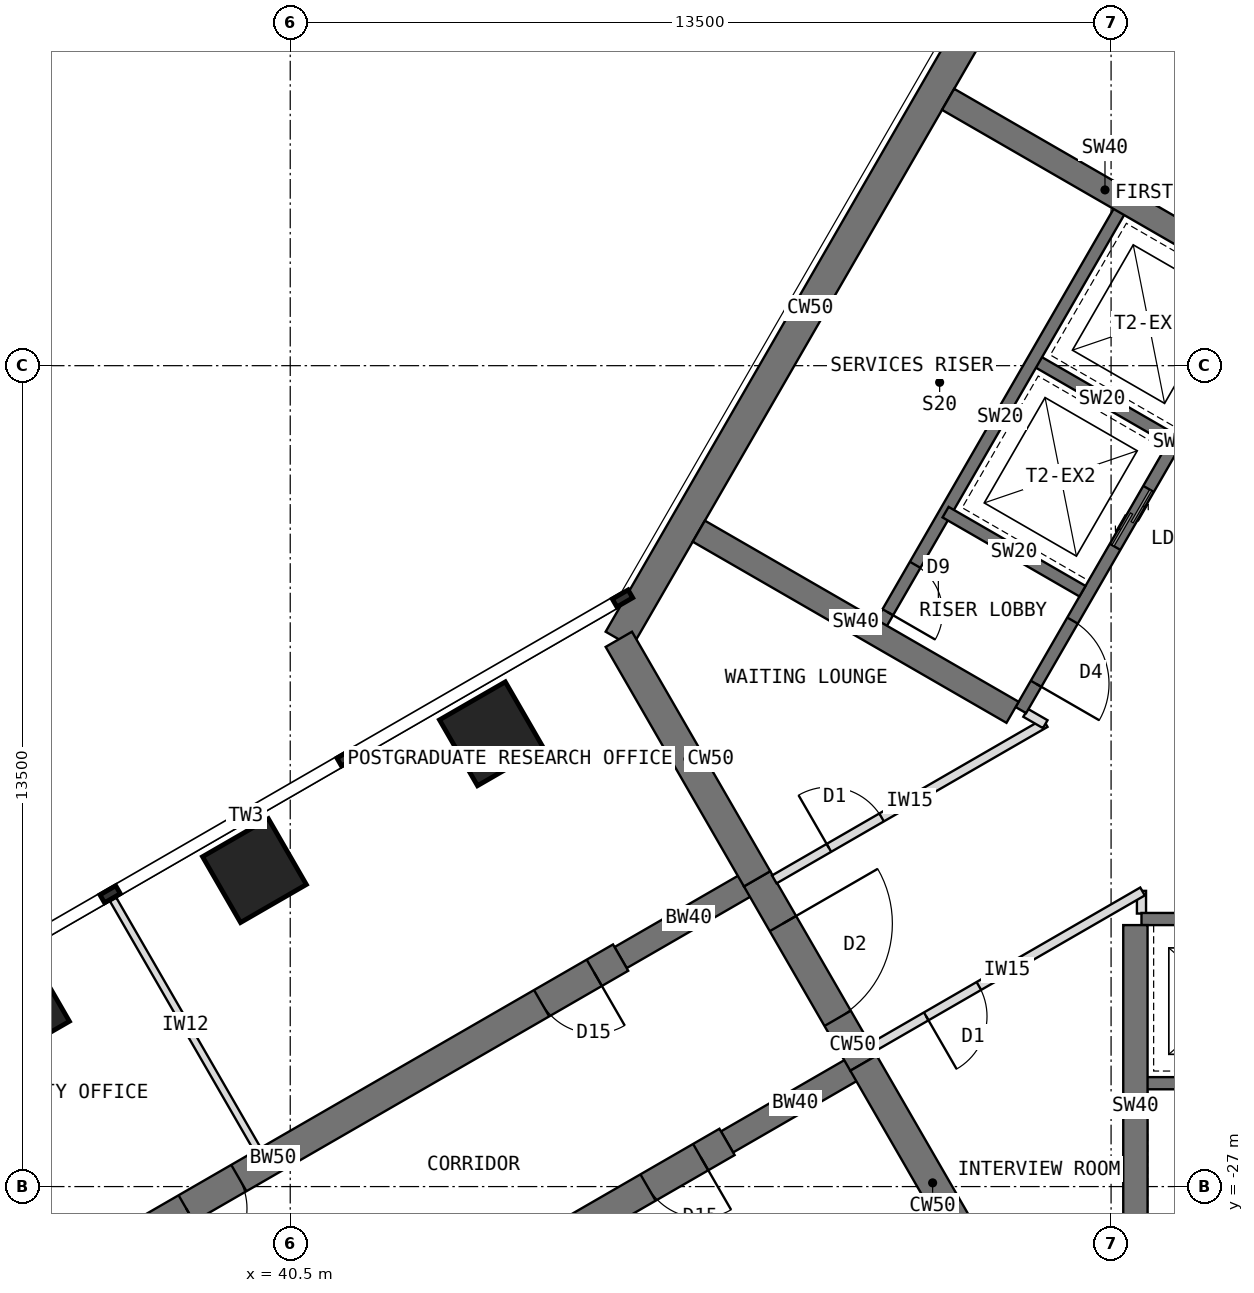
"""IFC4 building model, lengths in metres.
Left out: names, types, materials, properties, quantities, classifications, styles, units other than length and angle.
Written with IfcOpenShell. Run it as: python <this file> out.ifc"""

import sys

from ifc_helpers import new_model, si_unit, direction, frame, frame_2d, origin, origin_2d, place, context, subcontext, project, spatial, rectangle, extrude, element, fill, save


model = new_model("IFC4")
c1 = context("Model", 3, precision=1e-05, world=origin(), true_north=direction((0.0, 1.0)))
c2 = subcontext(c1, "Body", "Model", "MODEL_VIEW")
j1 = project(units=[si_unit("LENGTHUNIT", "METRE"), si_unit("PLANEANGLEUNIT", "RADIAN")], contexts=[c1])
p1 = place(None, origin())
s1 = spatial("IfcSite", under=j1, at=p1, CompositionType="ELEMENT")
p2 = place(p1, origin())
s2 = spatial("IfcBuilding", under=s1, at=p2, CompositionType="ELEMENT")
p3 = place(p2, frame((0.0, 0.0, 170.5)))
s3 = spatial("IfcBuildingStorey", under=s2, at=p3, CompositionType="ELEMENT", Elevation=170.5)
p4 = place(p3, frame((52.202, -7.092, 0.0), z_axis=(0.0, 0.0, 1.0), x_axis=(-0.500005998175, -0.866021940709, 0.0)))
e1 = element("IfcWall", 1, at=p4, inside=s3, PredefinedType="SHEAR", context=c2, shape_type="SweptSolid", body=[
    extrude(rectangle(XDim=12.596, YDim=0.5, at=frame_2d((6.298, 0.0))), origin(), (0.0, 0.0, 1.0), 4.0),
])
p5 = place(p3, frame((45.904, -18.0, 0.0), z_axis=(0.0, 0.0, 1.0), x_axis=(0.500024481964, -0.866011268655, 0.0)))
e2 = element("IfcWall", 2, at=p5, inside=s3, PredefinedType="SHEAR", context=c2, shape_type="SweptSolid", body=[
    extrude(rectangle(XDim=4.548, YDim=0.5, at=frame_2d((2.274, 0.0))), origin(), (0.0, 0.0, 1.0), 4.0),
])
p6 = place(p3, frame((48.178, -21.939, 0.0), z_axis=(0.0, 0.0, 1.0), x_axis=(0.500010275428, -0.866019471182, 0.0)))
e3 = element("IfcWall", 3, at=p6, inside=s3, PredefinedType="SHEAR", context=c2, shape_type="SweptSolid", body=[
    extrude(rectangle(XDim=3.5, YDim=0.5, at=frame_2d((1.75, 0.0))), origin(), (0.0, 0.0, 1.0), 4.0),
])
p7 = place(p6, frame((0.85, 0.0, 0.0)))
e4 = element("IfcOpeningElement", 4, at=p7, cuts=e3, PredefinedType="OPENING", context=c2, shape_type="SweptSolid", body=[
    extrude(rectangle(XDim=1.8, YDim=2.1, at=frame_2d((0.9, 1.05))), frame((0.0, 0.26, 0.0), z_axis=(0.0, -1.0, 0.0), x_axis=(1.0, 0.0, 0.0)), (0.0, 0.0, 1.0), 0.52),
])
p8 = place(p3, frame((49.928, -24.97, 0.0), z_axis=(0.0, 0.0, 1.0), x_axis=(0.499984222037, -0.866034513004, 0.0)))
e5 = element("IfcWall", 5, at=p8, inside=s3, PredefinedType="SHEAR", context=c2, shape_type="SweptSolid", body=[
    extrude(rectangle(XDim=4.548, YDim=0.5, at=frame_2d((2.274, 0.0))), origin(), (0.0, 0.0, 1.0), 4.0),
])
p9 = place(p3, frame((49.928, -24.97, 0.0), z_axis=(0.0, 0.0, 1.0), x_axis=(-0.866031863473, -0.499988811324, 0.0)))
e6 = element("IfcWall", 6, at=p9, inside=s3, PredefinedType="SHEAR", context=c2, shape_type="SweptSolid", body=[
    extrude(rectangle(XDim=2.592, YDim=0.4, at=frame_2d((1.296, 0.0))), origin(), (0.0, 0.0, 1.0), 4.0),
])
p10 = place(p3, frame((47.684, -26.266, 0.0), z_axis=(0.0, 0.0, 1.0), x_axis=(-0.866027579429, -0.499996231654, 0.0)))
e7 = element("IfcWall", 7, at=p10, inside=s3, PredefinedType="SHEAR", context=c2, shape_type="SweptSolid", body=[
    extrude(rectangle(XDim=13.2, YDim=0.5, at=frame_2d((6.6, 0.0))), origin(), (0.0, 0.0, 1.0), 4.0),
])
p11 = place(p10, frame((0.5, 0.0, 0.0)))
e8 = element("IfcOpeningElement", 8, at=p11, cuts=e7, PredefinedType="OPENING", context=c2, shape_type="SweptSolid", body=[
    extrude(rectangle(XDim=1.0, YDim=2.1, at=frame_2d((0.5, 1.05))), frame((0.0, 0.26, 0.0), z_axis=(0.0, -1.0, 0.0), x_axis=(1.0, 0.0, 0.0)), (0.0, 0.0, 1.0), 0.52),
])
p12 = place(p10, frame((7.25, 0.0, 0.0)))
e9 = element("IfcOpeningElement", 9, at=p12, cuts=e7, PredefinedType="OPENING", context=c2, shape_type="SweptSolid", body=[
    extrude(rectangle(XDim=1.0, YDim=2.1, at=frame_2d((0.5, 1.05))), frame((0.0, 0.26, 0.0), z_axis=(0.0, -1.0, 0.0), x_axis=(1.0, 0.0, 0.0)), (0.0, 0.0, 1.0), 0.52),
])
p13 = place(p3, frame((48.178, -21.939, 0.0), z_axis=(0.0, 0.0, 1.0), x_axis=(-0.866072649678, -0.499918158782, 0.0)))
e10 = element("IfcWall", 10, at=p13, inside=s3, PredefinedType="SHEAR", context=c2, shape_type="SweptSolid", body=[
    extrude(rectangle(XDim=2.592, YDim=0.4, at=frame_2d((1.296, 0.0))), origin(), (0.0, 0.0, 1.0), 4.0),
])
p14 = place(p3, frame((45.934, -23.234, 0.0), z_axis=(0.0, 0.0, 1.0), x_axis=(-0.866019570528, -0.500010103361, 0.0)))
e11 = element("IfcWall", 11, at=p14, inside=s3, PredefinedType="SHEAR", context=c2, shape_type="SweptSolid", body=[
    extrude(rectangle(XDim=13.2, YDim=0.5, at=frame_2d((6.6, 0.0))), origin(), (0.0, 0.0, 1.0), 4.0),
])
p15 = place(p14, frame((0.5, 0.0, 0.0)))
e12 = element("IfcOpeningElement", 12, at=p15, cuts=e11, PredefinedType="OPENING", context=c2, shape_type="SweptSolid", body=[
    extrude(rectangle(XDim=1.0, YDim=2.1, at=frame_2d((0.5, 1.05))), frame((0.0, 0.26, 0.0), z_axis=(0.0, -1.0, 0.0), x_axis=(1.0, 0.0, 0.0)), (0.0, 0.0, 1.0), 0.52),
])
p16 = place(p14, frame((7.25, 0.0, 0.0)))
e13 = element("IfcOpeningElement", 13, at=p16, cuts=e11, PredefinedType="OPENING", context=c2, shape_type="SweptSolid", body=[
    extrude(rectangle(XDim=1.0, YDim=2.1, at=frame_2d((0.5, 1.05))), frame((0.0, 0.26, 0.0), z_axis=(0.0, -1.0, 0.0), x_axis=(1.0, 0.0, 0.0)), (0.0, 0.0, 1.0), 0.52),
])
for number, where, z_axis, x_axis in (
    (14, (43.809, -19.554, 0.0), (0.0, 0.0, 1.0), (0.866, 0.5, 0.0)),
    (15, (39.912, -21.804, 0.0), (0.0, 0.0, 1.0), (0.866, 0.5, 0.0)),
    (16, (36.014, -24.054, 0.0), (0.0, 0.0, 1.0), (0.866, 0.5, 0.0)),
):
    element("IfcColumn", number, at=place(p3, frame(where, z_axis=z_axis, x_axis=x_axis)), inside=s3, PredefinedType="COLUMN", context=c2, shape_type="SweptSolid", body=[
        extrude(rectangle(XDim=1.25, YDim=1.25, at=origin_2d()), origin(), (0.0, 0.0, 1.0), 4.0),
    ])
p17 = place(p3, frame((56.516, -12.236, 0.0), z_axis=(0.0, 0.0, 1.0), x_axis=(-0.49999894854, -0.866026010844, 0.0)))
e17 = element("IfcWall", 17, at=p17, inside=s3, PredefinedType="SHEAR", context=c2, shape_type="SweptSolid", body=[
    extrude(rectangle(XDim=8.0, YDim=0.2, at=frame_2d((4.0, 0.0))), origin(), (0.0, 0.0, 1.0), 4.0),
])
p18 = place(p17, frame((6.3, 0.0, 0.0)))
e18 = element("IfcOpeningElement", 18, at=p18, cuts=e17, PredefinedType="OPENING", context=c2, shape_type="SweptSolid", body=[
    extrude(rectangle(XDim=1.2, YDim=2.1, at=frame_2d((0.6, 1.05))), frame((0.0, 0.11, 0.0), z_axis=(0.0, -1.0, 0.0), x_axis=(1.0, 0.0, 0.0)), (0.0, 0.0, 1.0), 0.22),
])
p19 = place(p17, frame((0.9, 0.0, 0.0)))
e19 = element("IfcOpeningElement", 19, at=p19, cuts=e17, PredefinedType="OPENING", context=c2, shape_type="SweptSolid", body=[
    extrude(rectangle(XDim=1.1, YDim=2.2, at=frame_2d((0.55, 1.1))), frame((0.0, 0.11, 0.0), z_axis=(0.0, -1.0, 0.0), x_axis=(1.0, 0.0, 0.0)), (0.0, 0.0, 1.0), 0.22),
])
p20 = place(p17, frame((3.8, 0.0, 0.0)))
e20 = element("IfcOpeningElement", 20, at=p20, cuts=e17, PredefinedType="OPENING", context=c2, shape_type="SweptSolid", body=[
    extrude(rectangle(XDim=1.1, YDim=2.2, at=frame_2d((0.55, 1.1))), frame((0.0, 0.11, 0.0), z_axis=(0.0, -1.0, 0.0), x_axis=(1.0, 0.0, 0.0)), (0.0, 0.0, 1.0), 0.22),
])
for number, where, z_axis, x_axis in (
    (21, (54.98, -14.697, 0.0), (0.0, 0.0, 1.0), (-0.866, 0.5, 0.0)),
    (22, (53.53, -17.209, 0.0), (0.0, 0.0, 1.0), (-0.866, 0.5, 0.0)),
):
    element("IfcWall", number, at=place(p3, frame(where, z_axis=z_axis, x_axis=x_axis)), inside=s3, PredefinedType="SHEAR", context=c2, shape_type="SweptSolid", body=[
        extrude(rectangle(XDim=2.6, YDim=0.2, at=frame_2d((1.3, 0.0))), origin(), (0.0, 0.0, 1.0), 4.0),
    ])
p21 = place(p3, frame((54.178, -10.886, 0.0), z_axis=(0.0, 0.0, 1.0), x_axis=(-0.49999894854, -0.866026010844, 0.0)))
e23 = element("IfcWall", 23, at=p21, inside=s3, PredefinedType="SHEAR", context=c2, shape_type="SweptSolid", body=[
    extrude(rectangle(XDim=8.0, YDim=0.2, at=frame_2d((4.0, 0.0))), origin(), (0.0, 0.0, 1.0), 4.0),
])
p22 = place(p21, frame((6.8, 0.0, 0.0)))
e24 = element("IfcOpeningElement", 24, at=p22, cuts=e23, PredefinedType="OPENING", context=c2, shape_type="SweptSolid", body=[
    extrude(rectangle(XDim=0.9, YDim=2.1, at=frame_2d((0.45, 1.05))), frame((0.0, 0.11, 0.0), z_axis=(0.0, -1.0, 0.0), x_axis=(1.0, 0.0, 0.0)), (0.0, 0.0, 1.0), 0.22),
])
p23 = place(p3, frame((52.38, -19.201, 0.0), z_axis=(0.0, 0.0, 1.0), x_axis=(-0.866012946976, 0.500021575205, 0.0)))
e25 = element("IfcWall", 25, at=p23, inside=s3, PredefinedType="SHEAR", context=c2, shape_type="SweptSolid", body=[
    extrude(rectangle(XDim=5.958, YDim=0.4, at=frame_2d((2.979, 0.0))), origin(), (0.0, 0.0, 1.0), 4.0),
])
p24 = place(p3, frame((56.48, -12.099, 0.0), z_axis=(0.0, 0.0, 1.0), x_axis=(-0.86602319114, 0.500003832394, 0.0)))
e26 = element("IfcWall", 26, at=p24, inside=s3, PredefinedType="SHEAR", context=c2, shape_type="SweptSolid", body=[
    extrude(rectangle(XDim=5.958, YDim=0.4, at=frame_2d((2.979, 0.0))), origin(), (0.0, 0.0, 1.0), 4.0),
])
p25 = place(p3, frame((54.5, -22.6, 0.0), z_axis=(0.0, 0.0, 1.0), x_axis=(1.0, 0.0, 0.0)))
e27 = element("IfcWall", 27, at=p25, inside=s3, PredefinedType="SHEAR", context=c2, shape_type="SweptSolid", body=[
    extrude(rectangle(XDim=8.0, YDim=0.2, at=frame_2d((4.0, 0.0))), origin(), (0.0, 0.0, 1.0), 4.0),
])
p26 = place(p25, frame((6.3, 0.0, 0.0)))
e28 = element("IfcOpeningElement", 28, at=p26, cuts=e27, PredefinedType="OPENING", context=c2, shape_type="SweptSolid", body=[
    extrude(rectangle(XDim=1.2, YDim=2.1, at=frame_2d((0.6, 1.05))), frame((0.0, 0.11, 0.0), z_axis=(0.0, -1.0, 0.0), x_axis=(1.0, 0.0, 0.0)), (0.0, 0.0, 1.0), 0.22),
])
p27 = place(p25, frame((0.9, 0.0, 0.0)))
e29 = element("IfcOpeningElement", 29, at=p27, cuts=e27, PredefinedType="OPENING", context=c2, shape_type="SweptSolid", body=[
    extrude(rectangle(XDim=1.1, YDim=2.2, at=frame_2d((0.55, 1.1))), frame((0.0, 0.11, 0.0), z_axis=(0.0, -1.0, 0.0), x_axis=(1.0, 0.0, 0.0)), (0.0, 0.0, 1.0), 0.22),
])
p28 = place(p3, frame((54.5, -25.3, 0.0), z_axis=(0.0, 0.0, 1.0), x_axis=(1.0, 0.0, 0.0)))
e30 = element("IfcWall", 30, at=p28, inside=s3, PredefinedType="SHEAR", context=c2, shape_type="SweptSolid", body=[
    extrude(rectangle(XDim=8.0, YDim=0.2, at=frame_2d((4.0, 0.0))), origin(), (0.0, 0.0, 1.0), 4.0),
])
p29 = place(p28, frame((6.7, 0.0, 0.0)))
e31 = element("IfcOpeningElement", 31, at=p29, cuts=e30, PredefinedType="OPENING", context=c2, shape_type="SweptSolid", body=[
    extrude(rectangle(XDim=1.1, YDim=2.1, at=frame_2d((0.55, 1.05))), frame((0.0, 0.11, 0.0), z_axis=(0.0, -1.0, 0.0), x_axis=(1.0, 0.0, 0.0)), (0.0, 0.0, 1.0), 0.22),
])
p30 = place(p3, frame((54.4, -22.7, 0.0), z_axis=(0.0, 0.0, 1.0), x_axis=(0.0, -1.0, 0.0)))
e32 = element("IfcWall", 32, at=p30, inside=s3, PredefinedType="SHEAR", context=c2, shape_type="SweptSolid", body=[
    extrude(rectangle(XDim=5.958, YDim=0.4, at=frame_2d((2.979, 0.0))), origin(), (0.0, 0.0, 1.0), 4.0),
])
p31 = place(p3, frame((39.963, -26.393, 0.0), z_axis=(0.0, 0.0, 1.0), x_axis=(-0.499986429846, 0.866033238375, 0.0)))
e33 = element("IfcWall", 33, at=p31, inside=s3, PredefinedType="PARTITIONING", context=c2, shape_type="SweptSolid", body=[
    extrude(rectangle(XDim=4.75, YDim=0.12, at=frame_2d((2.375, 0.0))), origin(), (0.0, 0.0, 1.0), 3.8),
])
p32 = place(p3, frame((54.5, -22.51, 0.0), z_axis=(0.0, 0.0, 1.0), x_axis=(0.0, 1.0, 0.0)))
e34 = element("IfcWall", 34, at=p32, inside=s3, PredefinedType="PARTITIONING", context=c2, shape_type="SweptSolid", body=[
    extrude(rectangle(XDim=0.373, YDim=0.15, at=frame_2d((0.187, 0.0))), origin(), (0.0, 0.0, 1.0), 3.8),
])
p33 = place(p3, frame((54.517, -22.147, 0.0), z_axis=(0.0, 0.0, 1.0), x_axis=(-0.866033096941, -0.499986674824, 0.0)))
e35 = element("IfcWall", 35, at=p33, inside=s3, PredefinedType="PARTITIONING", context=c2, shape_type="SweptSolid", body=[
    extrude(rectangle(XDim=5.146, YDim=0.15, at=frame_2d((2.573, 0.0))), origin(), (0.0, 0.0, 1.0), 3.8),
])
p34 = place(p33, frame((3.108, 0.0, 0.0)))
e36 = element("IfcOpeningElement", 36, at=p34, cuts=e35, PredefinedType="OPENING", context=c2, shape_type="SweptSolid", body=[
    extrude(rectangle(XDim=1.0, YDim=2.1, at=frame_2d((0.5, 1.05))), frame((0.0, 0.085, 0.0), z_axis=(0.0, -1.0, 0.0), x_axis=(1.0, 0.0, 0.0)), (0.0, 0.0, 1.0), 0.17),
])
p35 = place(p3, frame((48.461, -21.948, 0.0), z_axis=(0.0, 0.0, 1.0), x_axis=(0.866012552312, 0.500022258742, 0.0)))
e37 = element("IfcWall", 37, at=p35, inside=s3, PredefinedType="PARTITIONING", context=c2, shape_type="SweptSolid", body=[
    extrude(rectangle(XDim=5.146, YDim=0.15, at=frame_2d((2.573, 0.0))), origin(), (0.0, 0.0, 1.0), 3.8),
])
p36 = place(p35, frame((1.038, 0.0, 0.0)))
e38 = element("IfcOpeningElement", 38, at=p36, cuts=e37, PredefinedType="OPENING", context=c2, shape_type="SweptSolid", body=[
    extrude(rectangle(XDim=1.0, YDim=2.1, at=frame_2d((0.5, 1.05))), frame((0.0, 0.085, 0.0), z_axis=(0.0, -1.0, 0.0), x_axis=(1.0, 0.0, 0.0)), (0.0, 0.0, 1.0), 0.17),
])
p37 = place(p3, frame((52.917, -19.396, 0.0), z_axis=(0.0, 0.0, 1.0), x_axis=(-0.865978465477, 0.500081290722, 0.0)))
e39 = element("IfcWall", 39, at=p37, inside=s3, PredefinedType="PARTITIONING", context=c2, shape_type="SweptSolid", body=[
    extrude(rectangle(XDim=0.373, YDim=0.15, at=frame_2d((0.187, 0.0))), origin(), (0.0, 0.0, 1.0), 3.8),
])
p38 = place(p18, origin())
e40 = element("IfcDoor", 40, at=p38, inside=s3, OperationType="SINGLE_SWING_RIGHT", PredefinedType="DOOR", context=c2, shape_type="SweptSolid", body=[
    extrude(rectangle(XDim=1.2, YDim=2.1, at=frame_2d((0.6, 1.05))), frame((0.0, 0.025, 0.0), z_axis=(0.0, -1.0, 0.0), x_axis=(1.0, 0.0, 0.0)), (0.0, 0.0, 1.0), 0.05),
])
fill(e18, e40)
p39 = place(p20, origin())
e41 = element("IfcDoor", 41, at=p39, inside=s3, OperationType="DOUBLE_DOOR_SLIDING", PredefinedType="DOOR", context=c2, shape_type="SweptSolid", body=[
    extrude(rectangle(XDim=1.1, YDim=2.2, at=frame_2d((0.55, 1.1))), frame((0.0, 0.025, 0.0), z_axis=(0.0, -1.0, 0.0), x_axis=(1.0, 0.0, 0.0)), (0.0, 0.0, 1.0), 0.05),
])
fill(e20, e41)
p40 = place(p22, origin())
e42 = element("IfcDoor", 42, at=p40, inside=s3, OperationType="SINGLE_SWING_RIGHT", PredefinedType="DOOR", context=c2, shape_type="SweptSolid", body=[
    extrude(rectangle(XDim=0.9, YDim=2.1, at=frame_2d((0.45, 1.05))), frame((0.0, 0.025, 0.0), z_axis=(0.0, -1.0, 0.0), x_axis=(1.0, 0.0, 0.0)), (0.0, 0.0, 1.0), 0.05),
])
fill(e24, e42)
p41 = place(p7, origin())
e43 = element("IfcDoor", 43, at=p41, inside=s3, OperationType="DOUBLE_DOOR_DOUBLE_SWING", PredefinedType="DOOR", context=c2, shape_type="SweptSolid", body=[
    extrude(rectangle(XDim=1.8, YDim=2.1, at=frame_2d((0.9, 1.05))), frame((0.0, 0.025, 0.0), z_axis=(0.0, -1.0, 0.0), x_axis=(1.0, 0.0, 0.0)), (0.0, 0.0, 1.0), 0.05),
])
fill(e4, e43)
p42 = place(p36, origin())
e44 = element("IfcDoor", 44, at=p42, inside=s3, OperationType="SINGLE_SWING_LEFT", PredefinedType="DOOR", context=c2, shape_type="SweptSolid", body=[
    extrude(rectangle(XDim=1.0, YDim=2.1, at=frame_2d((0.5, 1.05))), frame((0.0, 0.025, 0.0), z_axis=(0.0, -1.0, 0.0), x_axis=(1.0, 0.0, 0.0)), (0.0, 0.0, 1.0), 0.05),
])
fill(e38, e44)
p43 = place(p34, origin())
e45 = element("IfcDoor", 45, at=p43, inside=s3, OperationType="SINGLE_SWING_RIGHT", PredefinedType="DOOR", context=c2, shape_type="SweptSolid", body=[
    extrude(rectangle(XDim=1.0, YDim=2.1, at=frame_2d((0.5, 1.05))), frame((0.0, 0.025, 0.0), z_axis=(0.0, -1.0, 0.0), x_axis=(1.0, 0.0, 0.0)), (0.0, 0.0, 1.0), 0.05),
])
fill(e36, e45)
p44 = place(p11, origin())
e46 = element("IfcDoor", 46, at=p44, inside=s3, OperationType="SINGLE_SWING_LEFT", PredefinedType="DOOR", context=c2, shape_type="SweptSolid", body=[
    extrude(rectangle(XDim=1.0, YDim=2.1, at=frame_2d((0.5, 1.05))), frame((0.0, 0.025, 0.0), z_axis=(0.0, -1.0, 0.0), x_axis=(1.0, 0.0, 0.0)), (0.0, 0.0, 1.0), 0.05),
])
fill(e8, e46)
p45 = place(p15, origin())
e47 = element("IfcDoor", 47, at=p45, inside=s3, OperationType="SINGLE_SWING_LEFT", PredefinedType="DOOR", context=c2, shape_type="SweptSolid", body=[
    extrude(rectangle(XDim=1.0, YDim=2.1, at=frame_2d((0.5, 1.05))), frame((0.0, 0.025, 0.0), z_axis=(0.0, -1.0, 0.0), x_axis=(1.0, 0.0, 0.0)), (0.0, 0.0, 1.0), 0.05),
])
fill(e12, e47)
p46 = place(p16, origin())
e48 = element("IfcDoor", 48, at=p46, inside=s3, OperationType="SINGLE_SWING_RIGHT", PredefinedType="DOOR", context=c2, shape_type="SweptSolid", body=[
    extrude(rectangle(XDim=1.0, YDim=2.1, at=frame_2d((0.5, 1.05))), frame((0.0, 0.025, 0.0), z_axis=(0.0, -1.0, 0.0), x_axis=(1.0, 0.0, 0.0)), (0.0, 0.0, 1.0), 0.05),
])
fill(e13, e48)
save(model, sys.argv[1])
